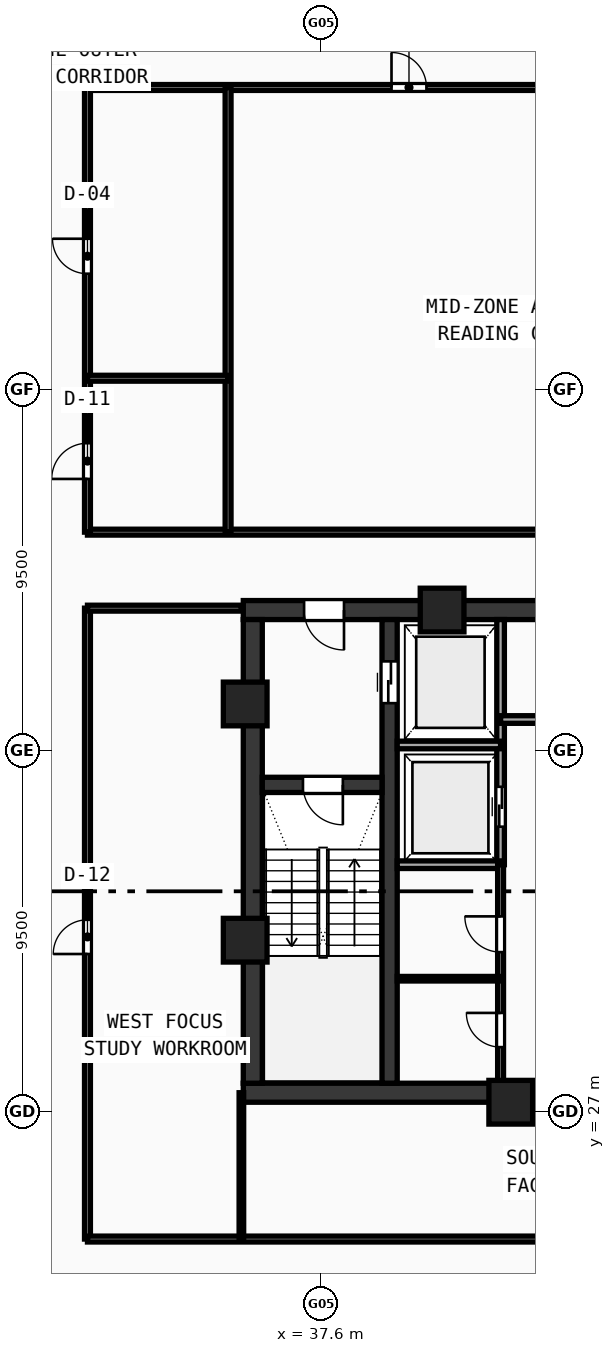
"""IFC4 building model, lengths in metres.
Left out: names, types, materials, properties, quantities, classifications, styles, units other than length and angle.
Written with IfcOpenShell. Run it as: python <this file> out.ifc"""

import sys

from ifc_helpers import new_model, si_unit, direction, frame, frame_2d, origin, origin_with_axes, origin_2d, place, context, subcontext, project, spatial, rectangle, hollow_rectangle, extrude, source, transform, mapped, element, fill, save


model = new_model("IFC4")
c1 = context("Model", 3, precision=1e-05, world=origin(), true_north=direction((0.0, 1.0)))
c2 = subcontext(c1, "Body", "Model", "MODEL_VIEW")
j1 = project(units=[si_unit("LENGTHUNIT", "METRE"), si_unit("PLANEANGLEUNIT", "RADIAN")], contexts=[c1])
p1 = place(None, origin())
s1 = spatial("IfcSite", under=j1, at=p1, CompositionType="ELEMENT")
p2 = place(p1, origin())
s2 = spatial("IfcBuilding", under=s1, at=p2, CompositionType="ELEMENT")
p3 = place(p2, frame((0.0, 0.0, 184.76)))
s3 = spatial("IfcBuildingStorey", under=s2, at=p3, CompositionType="ELEMENT", Elevation=184.76)
p4 = place(p3, frame((35.55, 27.5, 0.0), z_axis=(0.0, 0.0, 1.0), x_axis=(1.0, 0.0, 0.0)))
e1 = element("IfcWall", 1, at=p4, inside=s3, PredefinedType="SHEAR", context=c2, shape_type="SweptSolid", body=[
    extrude(rectangle(XDim=24.9, YDim=0.5, at=frame_2d((12.45, 0.0))), origin(), (0.0, 0.0, 1.0), 3.54),
])
p5 = place(p3, frame((35.55, 40.2, 0.0), z_axis=(0.0, 0.0, 1.0), x_axis=(1.0, 0.0, 0.0)))
e2 = element("IfcWall", 2, at=p5, inside=s3, PredefinedType="SHEAR", context=c2, shape_type="SweptSolid", body=[
    extrude(rectangle(XDim=11.25, YDim=0.5, at=frame_2d((5.625, 0.0))), origin(), (0.0, 0.0, 1.0), 3.54),
])
p6 = place(p5, frame((1.6, 0.0, 0.0)))
e3 = element("IfcOpeningElement", 3, at=p6, cuts=e2, PredefinedType="OPENING", context=c2, shape_type="SweptSolid", body=[
    extrude(rectangle(XDim=1.05, YDim=2.1, at=frame_2d((0.525, 1.05))), frame((0.0, 0.26, 0.0), z_axis=(0.0, -1.0, 0.0), x_axis=(1.0, 0.0, 0.0)), (0.0, 0.0, 1.0), 0.52),
])
p7 = place(p3, frame((35.8, 27.75, 0.0), z_axis=(0.0, 0.0, 1.0), x_axis=(0.0, 1.0, 0.0)))
e4 = element("IfcWall", 4, at=p7, inside=s3, PredefinedType="SHEAR", context=c2, shape_type="SweptSolid", body=[
    extrude(rectangle(XDim=12.2, YDim=0.5, at=frame_2d((6.1, 0.0))), origin(), (0.0, 0.0, 1.0), 3.54),
])
p8 = place(p3, frame((39.4, 27.75, 0.0), z_axis=(0.0, 0.0, 1.0), x_axis=(0.0, 1.0, 0.0)))
e5 = element("IfcWall", 5, at=p8, inside=s3, PredefinedType="SHEAR", context=c2, shape_type="SweptSolid", body=[
    extrude(rectangle(XDim=12.2, YDim=0.4, at=frame_2d((6.1, 0.0))), origin(), (0.0, 0.0, 1.0), 3.54),
])
p9 = place(p8, frame((10.0, 0.0, 0.0)))
e6 = element("IfcOpeningElement", 6, at=p9, cuts=e5, PredefinedType="OPENING", context=c2, shape_type="SweptSolid", body=[
    extrude(rectangle(XDim=1.1, YDim=2.1, at=frame_2d((0.55, 1.05))), frame((0.0, 0.21, 0.0), z_axis=(0.0, -1.0, 0.0), x_axis=(1.0, 0.0, 0.0)), (0.0, 0.0, 1.0), 0.42),
])
p10 = place(p3, frame((36.05, 35.6, 0.0), z_axis=(0.0, 0.0, 1.0), x_axis=(1.0, 0.0, 0.0)))
e7 = element("IfcWall", 7, at=p10, inside=s3, PredefinedType="SHEAR", context=c2, shape_type="SweptSolid", body=[
    extrude(rectangle(XDim=3.15, YDim=0.4, at=frame_2d((1.575, 0.0))), origin(), (0.0, 0.0, 1.0), 3.54),
])
p11 = place(p10, frame((1.07, 0.0, 0.0)))
e8 = element("IfcOpeningElement", 8, at=p11, cuts=e7, PredefinedType="OPENING", context=c2, shape_type="SweptSolid", body=[
    extrude(rectangle(XDim=1.05, YDim=2.1, at=frame_2d((0.525, 1.05))), frame((0.0, 0.21, 0.0), z_axis=(0.0, -1.0, 0.0), x_axis=(1.0, 0.0, 0.0)), (0.0, 0.0, 1.0), 0.42),
])
m1 = source(origin(), c2, "Body", "SweptSolid", [
    extrude(hollow_rectangle(XDim=1.15, YDim=1.15, WallThickness=0.048, at=origin_2d()), origin(), (0.0, 0.0, 1.0), 3.8),
])
for number, where, z_axis, x_axis in (
    (9, (42.588, 27.25, -0.26), (0.0, 0.0, 1.0), (1.0, 0.0, 0.0)),
    (10, (40.781, 40.2, -0.26), (0.0, 0.0, 1.0), (1.0, 0.0, 0.0)),
    (11, (35.6, 37.729, -0.26), (0.0, 0.0, 1.0), (1.0, 0.0, 0.0)),
    (12, (35.6, 31.513, -0.26), (0.0, 0.0, 1.0), (1.0, 0.0, 0.0)),
):
    element("IfcColumn", number, at=place(p3, frame(where, z_axis=z_axis, x_axis=x_axis)), inside=s3, PredefinedType="COLUMN", context=c2, shape_type="MappedRepresentation", body=[
        mapped(m1, transform((0.0, 0.0, 0.0), scale=1.0)),
    ])
p12 = place(p3, frame((42.32, 33.5, 0.0), z_axis=(0.0, 0.0, 1.0), x_axis=(0.0, 1.0, 0.0)))
e13 = element("IfcWall", 13, at=p12, inside=s3, PredefinedType="SOLIDWALL", context=c2, shape_type="SweptSolid", body=[
    extrude(rectangle(XDim=6.45, YDim=0.2, at=frame_2d((3.225, 0.0))), origin(), (0.0, 0.0, 1.0), 3.54),
])
p13 = place(p12, frame((1.0, 0.0, 0.0)))
e14 = element("IfcOpeningElement", 14, at=p13, cuts=e13, PredefinedType="OPENING", context=c2, shape_type="SweptSolid", body=[
    extrude(rectangle(XDim=1.05, YDim=2.1, at=frame_2d((0.525, 1.05))), frame((0.0, 0.11, 0.0), z_axis=(0.0, -1.0, 0.0), x_axis=(1.0, 0.0, 0.0)), (0.0, 0.0, 1.0), 0.22),
])
for number, where, z_axis, x_axis in (
    (15, (39.6, 36.65, 0.0), (0.0, 0.0, 1.0), (1.0, 0.0, 0.0)),
    (16, (39.6, 33.5, 0.0), (0.0, 0.0, 1.0), (1.0, 0.0, 0.0)),
):
    element("IfcWall", number, at=place(p3, frame(where, z_axis=z_axis, x_axis=x_axis)), inside=s3, PredefinedType="SOLIDWALL", context=c2, shape_type="SweptSolid", body=[
        extrude(rectangle(XDim=2.72, YDim=0.2, at=frame_2d((1.36, 0.0))), origin(), (0.0, 0.0, 1.0), 3.54),
    ])
p14 = place(p3, frame((42.32, 37.32, 0.0), z_axis=(0.0, 0.0, 1.0), x_axis=(1.0, 0.0, 0.0)))
e17 = element("IfcWall", 17, at=p14, inside=s3, PredefinedType="SOLIDWALL", context=c2, shape_type="SweptSolid", body=[
    extrude(rectangle(XDim=4.73, YDim=0.2, at=frame_2d((2.365, 0.0))), origin(), (0.0, 0.0, 1.0), 3.54),
])
p15 = place(p14, frame((1.8, 0.0, 0.0)))
e18 = element("IfcOpeningElement", 18, at=p15, cuts=e17, PredefinedType="OPENING", context=c2, shape_type="SweptSolid", body=[
    extrude(rectangle(XDim=0.9, YDim=2.1, at=frame_2d((0.45, 1.05))), frame((0.0, 0.11, 0.0), z_axis=(0.0, -1.0, 0.0), x_axis=(1.0, 0.0, 0.0)), (0.0, 0.0, 1.0), 0.22),
])
p16 = place(p3, frame((42.32, 27.6, 0.0), z_axis=(0.0, 0.0, 1.0), x_axis=(0.0, 1.0, 0.0)))
e19 = element("IfcWall", 19, at=p16, inside=s3, PredefinedType="PARTITIONING", context=c2, shape_type="SweptSolid", body=[
    extrude(rectangle(XDim=5.9, YDim=0.155, at=frame_2d((2.95, 0.0))), origin(), (0.0, 0.0, 1.0), 3.54),
])
p17 = place(p16, frame((1.1, 0.0, 0.0)))
e20 = element("IfcOpeningElement", 20, at=p17, cuts=e19, PredefinedType="OPENING", context=c2, shape_type="SweptSolid", body=[
    extrude(rectangle(XDim=0.9, YDim=2.1, at=frame_2d((0.45, 1.05))), frame((0.0, 0.087, 0.0), z_axis=(0.0, -1.0, 0.0), x_axis=(1.0, 0.0, 0.0)), (0.0, 0.0, 1.0), 0.175),
])
p18 = place(p16, frame((3.6, 0.0, 0.0)))
e21 = element("IfcOpeningElement", 21, at=p18, cuts=e19, PredefinedType="OPENING", context=c2, shape_type="SweptSolid", body=[
    extrude(rectangle(XDim=0.94, YDim=2.1, at=frame_2d((0.47, 1.05))), frame((0.0, 0.087, 0.0), z_axis=(0.0, -1.0, 0.0), x_axis=(1.0, 0.0, 0.0)), (0.0, 0.0, 1.0), 0.175),
])
p19 = place(p3, frame((39.6, 30.5, 0.0), z_axis=(0.0, 0.0, 1.0), x_axis=(1.0, 0.0, 0.0)))
e22 = element("IfcWall", 22, at=p19, inside=s3, PredefinedType="PARTITIONING", context=c2, shape_type="SweptSolid", body=[
    extrude(rectangle(XDim=2.72, YDim=0.12, at=frame_2d((1.36, 0.0))), origin(), (0.0, 0.0, 1.0), 3.54),
])
p20 = place(p3, frame((31.45, 42.25, 0.0), z_axis=(0.0, 0.0, 1.0), x_axis=(1.0, 0.0, 0.0)))
e23 = element("IfcWall", 23, at=p20, inside=s3, PredefinedType="PARTITIONING", context=c2, shape_type="SweptSolid", body=[
    extrude(rectangle(XDim=33.1, YDim=0.155, at=frame_2d((16.55, 0.0))), origin(), (0.0, 0.0, 1.0), 2.89),
])
p21 = place(p3, frame((31.45, 53.95, 0.0), z_axis=(0.0, 0.0, 1.0), x_axis=(1.0, 0.0, 0.0)))
e24 = element("IfcWall", 24, at=p21, inside=s3, PredefinedType="PARTITIONING", context=c2, shape_type="SweptSolid", body=[
    extrude(rectangle(XDim=33.1, YDim=0.155, at=frame_2d((16.55, 0.0))), origin(), (0.0, 0.0, 1.0), 2.89),
])
p22 = place(p21, frame((8.0, 0.0, 0.0)))
e25 = element("IfcOpeningElement", 25, at=p22, cuts=e24, PredefinedType="OPENING", context=c2, shape_type="SweptSolid", body=[
    extrude(rectangle(XDim=0.92, YDim=2.1, at=frame_2d((0.46, 1.05))), frame((0.0, 0.087, 0.0), z_axis=(0.0, -1.0, 0.0), x_axis=(1.0, 0.0, 0.0)), (0.0, 0.0, 1.0), 0.175),
])
p23 = place(p21, frame((21.55, 0.0, 0.0)))
e26 = element("IfcOpeningElement", 26, at=p23, cuts=e24, PredefinedType="OPENING", context=c2, shape_type="SweptSolid", body=[
    extrude(rectangle(XDim=0.92, YDim=2.1, at=frame_2d((0.46, 1.05))), frame((0.0, 0.087, 0.0), z_axis=(0.0, -1.0, 0.0), x_axis=(1.0, 0.0, 0.0)), (0.0, 0.0, 1.0), 0.175),
])
p24 = place(p3, frame((31.45, 42.25, 0.0), z_axis=(0.0, 0.0, 1.0), x_axis=(0.0, 1.0, 0.0)))
e27 = element("IfcWall", 27, at=p24, inside=s3, PredefinedType="PARTITIONING", context=c2, shape_type="SweptSolid", body=[
    extrude(rectangle(XDim=11.7, YDim=0.155, at=frame_2d((5.85, 0.0))), origin(), (0.0, 0.0, 1.0), 2.89),
])
p25 = place(p24, frame((1.4, 0.0, 0.0)))
e28 = element("IfcOpeningElement", 28, at=p25, cuts=e27, PredefinedType="OPENING", context=c2, shape_type="SweptSolid", body=[
    extrude(rectangle(XDim=0.94, YDim=2.1, at=frame_2d((0.47, 1.05))), frame((0.0, 0.087, 0.0), z_axis=(0.0, -1.0, 0.0), x_axis=(1.0, 0.0, 0.0)), (0.0, 0.0, 1.0), 0.175),
])
p26 = place(p24, frame((6.8, 0.0, 0.0)))
e29 = element("IfcOpeningElement", 29, at=p26, cuts=e27, PredefinedType="OPENING", context=c2, shape_type="SweptSolid", body=[
    extrude(rectangle(XDim=0.92, YDim=2.1, at=frame_2d((0.46, 1.05))), frame((0.0, 0.087, 0.0), z_axis=(0.0, -1.0, 0.0), x_axis=(1.0, 0.0, 0.0)), (0.0, 0.0, 1.0), 0.175),
])
p27 = place(p3, frame((35.15, 42.25, 0.0), z_axis=(0.0, 0.0, 1.0), x_axis=(0.0, 1.0, 0.0)))
e30 = element("IfcWall", 30, at=p27, inside=s3, PredefinedType="PARTITIONING", context=c2, shape_type="SweptSolid", body=[
    extrude(rectangle(XDim=11.7, YDim=0.155, at=frame_2d((5.85, 0.0))), origin(), (0.0, 0.0, 1.0), 2.89),
])
p28 = place(p3, frame((31.45, 46.3, 0.0), z_axis=(0.0, 0.0, 1.0), x_axis=(1.0, 0.0, 0.0)))
e31 = element("IfcWall", 31, at=p28, inside=s3, PredefinedType="PARTITIONING", context=c2, shape_type="SweptSolid", body=[
    extrude(rectangle(XDim=3.7, YDim=0.155, at=frame_2d((1.85, 0.0))), origin(), (0.0, 0.0, 1.0), 2.89),
])
p29 = place(p3, frame((31.45, 23.65, 0.0), z_axis=(0.0, 0.0, 1.0), x_axis=(0.0, 1.0, 0.0)))
e32 = element("IfcWall", 32, at=p29, inside=s3, PredefinedType="PARTITIONING", context=c2, shape_type="SweptSolid", body=[
    extrude(rectangle(XDim=16.6, YDim=0.155, at=frame_2d((8.3, 0.0))), origin(), (0.0, 0.0, 1.0), 2.89),
])
p30 = place(p29, frame((7.5, 0.0, 0.0)))
e33 = element("IfcOpeningElement", 33, at=p30, cuts=e32, PredefinedType="OPENING", context=c2, shape_type="SweptSolid", body=[
    extrude(rectangle(XDim=0.9, YDim=2.08, at=frame_2d((0.45, 1.04))), frame((0.0, 0.087, 0.0), z_axis=(0.0, -1.0, 0.0), x_axis=(1.0, 0.0, 0.0)), (0.0, 0.0, 1.0), 0.175),
])
p31 = place(p3, frame((31.45, 23.65, 0.0), z_axis=(0.0, 0.0, 1.0), x_axis=(1.0, 0.0, 0.0)))
e34 = element("IfcWall", 34, at=p31, inside=s3, PredefinedType="PARTITIONING", context=c2, shape_type="SweptSolid", body=[
    extrude(rectangle(XDim=33.1, YDim=0.155, at=frame_2d((16.55, 0.0))), origin(), (0.0, 0.0, 1.0), 2.89),
])
p32 = place(p31, frame((16.0, 0.0, 0.0)))
e35 = element("IfcOpeningElement", 35, at=p32, cuts=e34, PredefinedType="OPENING", context=c2, shape_type="SweptSolid", body=[
    extrude(rectangle(XDim=0.92, YDim=2.1, at=frame_2d((0.46, 1.05))), frame((0.0, 0.087, 0.0), z_axis=(0.0, -1.0, 0.0), x_axis=(1.0, 0.0, 0.0)), (0.0, 0.0, 1.0), 0.175),
])
p33 = place(p3, frame((31.45, 40.25, 0.0), z_axis=(0.0, 0.0, 1.0), x_axis=(1.0, 0.0, 0.0)))
e36 = element("IfcWall", 36, at=p33, inside=s3, PredefinedType="PARTITIONING", context=c2, shape_type="SweptSolid", body=[
    extrude(rectangle(XDim=4.05, YDim=0.155, at=frame_2d((2.025, 0.0))), origin(), (0.0, 0.0, 1.0), 3.54),
])
p34 = place(p3, frame((35.5, 23.65, 0.0), z_axis=(0.0, 0.0, 1.0), x_axis=(0.0, 1.0, 0.0)))
e37 = element("IfcWall", 37, at=p34, inside=s3, PredefinedType="PARTITIONING", context=c2, shape_type="SweptSolid", body=[
    extrude(rectangle(XDim=3.85, YDim=0.12, at=frame_2d((1.925, 0.0))), origin(), (0.0, 0.0, 1.0), 3.14),
])
m2 = source(origin(), c2, "Body", "SweptSolid", [
    extrude(rectangle(XDim=1.05, YDim=2.1, at=frame_2d((0.525, 1.05))), frame((0.0, 0.025, 0.0), z_axis=(0.0, -1.0, 0.0), x_axis=(1.0, 0.0, 0.0)), (0.0, 0.0, 1.0), 0.05),
])
p35 = place(p11, frame((1.05, 0.0, 0.0), z_axis=(0.0, 0.0, 1.0), x_axis=(-1.0, 0.0, 0.0)))
e38 = element("IfcDoor", 38, at=p35, inside=s3, OperationType="SINGLE_SWING_LEFT", PredefinedType="DOOR", context=c2, shape_type="MappedRepresentation", body=[
    mapped(m2, transform((0.0, 0.0, 0.0), scale=1.0)),
])
fill(e8, e38)
p36 = place(p6, frame((1.05, 0.0, 0.0), z_axis=(0.0, 0.0, 1.0), x_axis=(-1.0, 0.0, 0.0)))
e39 = element("IfcDoor", 39, at=p36, inside=s3, OperationType="SINGLE_SWING_LEFT", PredefinedType="DOOR", context=c2, shape_type="MappedRepresentation", body=[
    mapped(m2, transform((0.0, 0.0, 0.0), scale=1.0)),
])
fill(e3, e39)
m3 = source(origin(), c2, "Body", "SweptSolid", [
    extrude(rectangle(XDim=1.1, YDim=2.1, at=frame_2d((0.55, 1.05))), frame((0.0, 0.025, 0.0), z_axis=(0.0, -1.0, 0.0), x_axis=(1.0, 0.0, 0.0)), (0.0, 0.0, 1.0), 0.05),
])
p37 = place(p9, frame((1.1, 0.0, 0.0), z_axis=(0.0, 0.0, 1.0), x_axis=(-1.0, 0.0, 0.0)))
e40 = element("IfcDoor", 40, at=p37, inside=s3, OperationType="DOUBLE_DOOR_SLIDING", PredefinedType="DOOR", context=c2, shape_type="MappedRepresentation", body=[
    mapped(m3, transform((0.0, 0.0, 0.0), scale=1.0)),
])
fill(e6, e40)
p38 = place(p13, origin_with_axes())
e41 = element("IfcDoor", 41, at=p38, inside=s3, OperationType="DOUBLE_DOOR_SLIDING", PredefinedType="DOOR", context=c2, shape_type="MappedRepresentation", body=[
    mapped(m2, transform((0.0, 0.0, 0.0), scale=1.0)),
])
fill(e14, e41)
m4 = source(origin(), c2, "Body", "SweptSolid", [
    extrude(rectangle(XDim=0.9, YDim=2.1, at=frame_2d((0.45, 1.05))), frame((0.0, 0.025, 0.0), z_axis=(0.0, -1.0, 0.0), x_axis=(1.0, 0.0, 0.0)), (0.0, 0.0, 1.0), 0.05),
])
p39 = place(p17, origin_with_axes())
e42 = element("IfcDoor", 42, at=p39, inside=s3, OperationType="SINGLE_SWING_RIGHT", PredefinedType="DOOR", context=c2, shape_type="MappedRepresentation", body=[
    mapped(m4, transform((0.0, 0.0, 0.0), scale=1.0)),
])
fill(e20, e42)
m5 = source(origin(), c2, "Body", "SweptSolid", [
    extrude(rectangle(XDim=0.94, YDim=2.1, at=frame_2d((0.47, 1.05))), frame((0.0, 0.025, 0.0), z_axis=(0.0, -1.0, 0.0), x_axis=(1.0, 0.0, 0.0)), (0.0, 0.0, 1.0), 0.05),
])
p40 = place(p18, origin_with_axes())
e43 = element("IfcDoor", 43, at=p40, inside=s3, OperationType="SINGLE_SWING_RIGHT", PredefinedType="DOOR", context=c2, shape_type="MappedRepresentation", body=[
    mapped(m5, transform((0.0, 0.0, 0.0), scale=1.0)),
])
fill(e21, e43)
p41 = place(p25, origin_with_axes())
e44 = element("IfcDoor", 44, at=p41, inside=s3, OperationType="SINGLE_SWING_LEFT", PredefinedType="DOOR", context=c2, shape_type="MappedRepresentation", body=[
    mapped(m5, transform((0.0, 0.0, 0.0), scale=1.0)),
])
fill(e28, e44)
m6 = source(origin(), c2, "Body", "SweptSolid", [
    extrude(rectangle(XDim=0.92, YDim=2.1, at=frame_2d((0.46, 1.05))), frame((0.0, 0.025, 0.0), z_axis=(0.0, -1.0, 0.0), x_axis=(1.0, 0.0, 0.0)), (0.0, 0.0, 1.0), 0.05),
])
p42 = place(p26, origin_with_axes())
e45 = element("IfcDoor", 45, at=p42, inside=s3, OperationType="SINGLE_SWING_RIGHT", PredefinedType="DOOR", context=c2, shape_type="MappedRepresentation", body=[
    mapped(m6, transform((0.0, 0.0, 0.0), scale=1.0)),
])
fill(e29, e45)
p43 = place(p22, origin_with_axes())
e46 = element("IfcDoor", 46, at=p43, inside=s3, OperationType="SINGLE_SWING_LEFT", PredefinedType="DOOR", context=c2, shape_type="MappedRepresentation", body=[
    mapped(m6, transform((0.0, 0.0, 0.0), scale=1.0)),
])
fill(e25, e46)
m7 = source(origin(), c2, "Body", "SweptSolid", [
    extrude(rectangle(XDim=0.9, YDim=2.08, at=frame_2d((0.45, 1.04))), frame((0.0, 0.025, 0.0), z_axis=(0.0, -1.0, 0.0), x_axis=(1.0, 0.0, 0.0)), (0.0, 0.0, 1.0), 0.05),
])
p44 = place(p30, origin_with_axes())
e47 = element("IfcDoor", 47, at=p44, inside=s3, OperationType="SINGLE_SWING_LEFT", PredefinedType="DOOR", context=c2, shape_type="MappedRepresentation", body=[
    mapped(m7, transform((0.0, 0.0, 0.0), scale=1.0)),
])
fill(e33, e47)
save(model, sys.argv[1])
